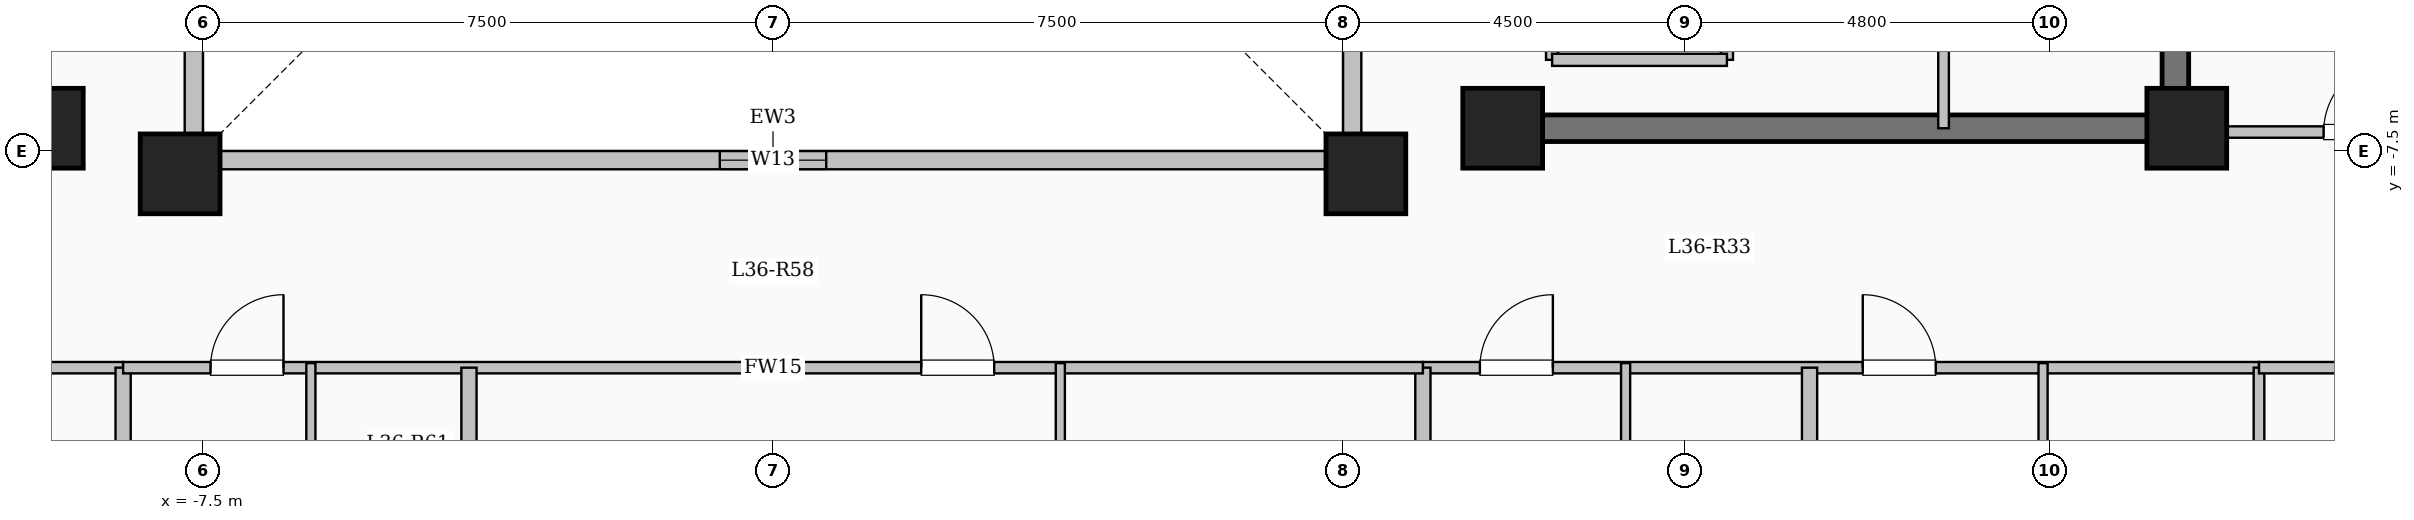
"""IFC4 building model, lengths in metres.
Left out: names, types, materials, properties, quantities, classifications, styles, units other than length and angle.
Written with IfcOpenShell. Run it as: python <this file> out.ifc"""

import sys

from ifc_helpers import new_model, si_unit, direction, frame, frame_2d, origin, origin_2d, place, context, subcontext, project, spatial, rectangle, extrude, element, fill, save


model = new_model("IFC4")
c1 = context("Model", 3, precision=1e-05, world=origin(), true_north=direction((0.0, 1.0)))
c2 = subcontext(c1, "Body", "Model", "MODEL_VIEW")
j1 = project(units=[si_unit("LENGTHUNIT", "METRE"), si_unit("PLANEANGLEUNIT", "RADIAN")], contexts=[c1])
p1 = place(None, origin())
s1 = spatial("IfcSite", under=j1, at=p1, CompositionType="ELEMENT")
p2 = place(p1, origin())
s2 = spatial("IfcBuilding", under=s1, at=p2, CompositionType="ELEMENT")
p3 = place(p2, frame((0.0, 0.0, 135.95)))
s3 = spatial("IfcBuildingStorey", under=s2, at=p3, CompositionType="ELEMENT", Elevation=135.95)
for number, where, z_axis, x_axis in (
    (1, (-7.8, -7.8, 0.0), (0.0, 0.0, 1.0), (1.0, 0.0, 0.0)),
    (2, (7.8, -7.8, 0.0), (0.0, 0.0, 1.0), (1.0, 0.0, 0.0)),
    (3, (-9.6, -7.2, 0.0), (0.0, 0.0, 1.0), (1.0, 0.0, 0.0)),
    (4, (9.6, -7.2, 0.0), (0.0, 0.0, 1.0), (1.0, 0.0, 0.0)),
    (5, (18.6, -7.2, 0.0), (0.0, 0.0, 1.0), (1.0, 0.0, 0.0)),
):
    element("IfcColumn", number, at=place(p3, frame(where, z_axis=z_axis, x_axis=x_axis)), inside=s3, PredefinedType="COLUMN", context=c2, shape_type="SweptSolid", body=[
        extrude(rectangle(XDim=1.05, YDim=1.05, at=origin_2d()), origin(), (0.0, 0.0, 1.0), 3.35),
    ])
p4 = place(p3, frame((-7.62, -7.62, 0.0), z_axis=(0.0, 0.0, 1.0), x_axis=(1.0, 0.0, 0.0)))
e6 = element("IfcWall", 6, at=p4, inside=s3, PredefinedType="SOLIDWALL", context=c2, shape_type="SweptSolid", body=[
    extrude(rectangle(XDim=15.24, YDim=0.24, at=frame_2d((7.62, 0.0))), origin(), (0.0, 0.0, 1.0), 3.1),
])
p5 = place(p4, frame((6.92, 0.0, 0.95)))
e7 = element("IfcOpeningElement", 7, at=p5, cuts=e6, PredefinedType="OPENING", context=c2, shape_type="SweptSolid", body=[
    extrude(rectangle(XDim=1.4, YDim=1.5, at=frame_2d((0.7, 0.75))), frame((0.0, 0.13, 0.0), z_axis=(0.0, -1.0, 0.0), x_axis=(1.0, 0.0, 0.0)), (0.0, 0.0, 1.0), 0.26),
])
p6 = place(p3, frame((7.62, -7.62, 0.0), z_axis=(0.0, 0.0, 1.0), x_axis=(0.0, 1.0, 0.0)))
e8 = element("IfcWall", 8, at=p6, inside=s3, PredefinedType="SOLIDWALL", context=c2, shape_type="SweptSolid", body=[
    extrude(rectangle(XDim=15.24, YDim=0.24, at=frame_2d((7.62, 0.0))), origin(), (0.0, 0.0, 1.0), 3.1),
])
p7 = place(p6, frame((6.92, 0.0, 0.95)))
e9 = element("IfcOpeningElement", 9, at=p7, cuts=e8, PredefinedType="OPENING", context=c2, shape_type="SweptSolid", body=[
    extrude(rectangle(XDim=1.4, YDim=1.5, at=frame_2d((0.7, 0.75))), frame((0.0, 0.13, 0.0), z_axis=(0.0, -1.0, 0.0), x_axis=(1.0, 0.0, 0.0)), (0.0, 0.0, 1.0), 0.26),
])
p8 = place(p3, frame((-7.62, 7.62, 0.0), z_axis=(0.0, 0.0, 1.0), x_axis=(0.0, -1.0, 0.0)))
e10 = element("IfcWall", 10, at=p8, inside=s3, PredefinedType="SOLIDWALL", context=c2, shape_type="SweptSolid", body=[
    extrude(rectangle(XDim=15.24, YDim=0.24, at=frame_2d((7.62, 0.0))), origin(), (0.0, 0.0, 1.0), 3.1),
])
p9 = place(p8, frame((6.92, 0.0, 0.95)))
e11 = element("IfcOpeningElement", 11, at=p9, cuts=e10, PredefinedType="OPENING", context=c2, shape_type="SweptSolid", body=[
    extrude(rectangle(XDim=1.4, YDim=1.5, at=frame_2d((0.7, 0.75))), frame((0.0, 0.13, 0.0), z_axis=(0.0, -1.0, 0.0), x_axis=(1.0, 0.0, 0.0)), (0.0, 0.0, 1.0), 0.26),
])
p10 = place(p3, frame((10.25, -6.3, 0.0), z_axis=(0.0, 0.0, 1.0), x_axis=(0.0, 1.0, 0.0)))
e12 = element("IfcWall", 12, at=p10, inside=s3, PredefinedType="SOLIDWALL", context=c2, shape_type="SweptSolid", body=[
    extrude(rectangle(XDim=2.6, YDim=0.16, at=frame_2d((1.3, 0.0))), origin(), (0.0, 0.0, 1.0), 3.1),
])
p11 = place(p10, frame((0.75, 0.0, 0.0)))
e13 = element("IfcOpeningElement", 13, at=p11, cuts=e12, PredefinedType="OPENING", context=c2, shape_type="SweptSolid", body=[
    extrude(rectangle(XDim=1.1, YDim=2.15, at=frame_2d((0.55, 1.075))), frame((0.0, 0.09, 0.0), z_axis=(0.0, -1.0, 0.0), x_axis=(1.0, 0.0, 0.0)), (0.0, 0.0, 1.0), 0.18),
])
p12 = place(p3, frame((12.55, -6.3, 0.0), z_axis=(0.0, 0.0, 1.0), x_axis=(0.0, 1.0, 0.0)))
e14 = element("IfcWall", 14, at=p12, inside=s3, PredefinedType="SOLIDWALL", context=c2, shape_type="SweptSolid", body=[
    extrude(rectangle(XDim=2.6, YDim=0.16, at=frame_2d((1.3, 0.0))), origin(), (0.0, 0.0, 1.0), 3.1),
])
p13 = place(p3, frame((10.25, -6.3, 0.0), z_axis=(0.0, 0.0, 1.0), x_axis=(1.0, 0.0, 0.0)))
e15 = element("IfcWall", 15, at=p13, inside=s3, PredefinedType="SOLIDWALL", context=c2, shape_type="SweptSolid", body=[
    extrude(rectangle(XDim=2.3, YDim=0.16, at=frame_2d((1.15, 0.0))), origin(), (0.0, 0.0, 1.0), 3.1),
])
p14 = place(p3, frame((18.45, -7.375, 0.0), z_axis=(0.0, 0.0, 1.0), x_axis=(0.0, 1.0, 0.0)))
e16 = element("IfcWall", 16, at=p14, inside=s3, PredefinedType="SHEAR", context=c2, shape_type="SweptSolid", body=[
    extrude(rectangle(XDim=14.05, YDim=0.35, at=frame_2d((7.025, 0.0))), origin(), (0.0, 0.0, 1.0), 3.35),
])
p15 = place(p3, frame((10.075, -7.2, 0.0), z_axis=(0.0, 0.0, 1.0), x_axis=(1.0, 0.0, 0.0)))
e17 = element("IfcWall", 17, at=p15, inside=s3, PredefinedType="SHEAR", context=c2, shape_type="SweptSolid", body=[
    extrude(rectangle(XDim=8.55, YDim=0.35, at=frame_2d((4.275, 0.0))), origin(), (0.0, 0.0, 1.0), 3.35),
])
p16 = place(p3, frame((15.4, -7.2, 0.0), z_axis=(0.0, 0.0, 1.0), x_axis=(0.0, 1.0, 0.0)))
e18 = element("IfcWall", 18, at=p16, inside=s3, PredefinedType="PARTITIONING", context=c2, shape_type="SweptSolid", body=[
    extrude(rectangle(XDim=10.45, YDim=0.14, at=frame_2d((5.225, 0.0))), origin(), (0.0, 0.0, 1.0), 3.1),
])
p17 = place(p16, frame((9.25, 0.0, 0.0)))
e19 = element("IfcOpeningElement", 19, at=p17, cuts=e18, PredefinedType="OPENING", context=c2, shape_type="SweptSolid", body=[
    extrude(rectangle(XDim=0.9, YDim=2.08, at=frame_2d((0.45, 1.04))), frame((0.0, 0.08, 0.0), z_axis=(0.0, -1.0, 0.0), x_axis=(1.0, 0.0, 0.0)), (0.0, 0.0, 1.0), 0.16),
])
p18 = place(p3, frame((-19.55, -10.35, 0.0), z_axis=(0.0, 0.0, 1.0), x_axis=(1.0, 0.0, 0.0)))
e20 = element("IfcWall", 20, at=p18, inside=s3, PredefinedType="PARTITIONING", context=c2, shape_type="SweptSolid", body=[
    extrude(rectangle(XDim=11.0, YDim=0.15, at=frame_2d((5.5, 0.0))), origin(), (0.0, 0.0, 1.0), 3.1),
])
p19 = place(p18, frame((0.7, 0.0, 0.0)))
e21 = element("IfcOpeningElement", 21, at=p19, cuts=e20, PredefinedType="OPENING", context=c2, shape_type="SweptSolid", body=[
    extrude(rectangle(XDim=0.96, YDim=2.15, at=frame_2d((0.48, 1.075))), frame((0.0, 0.085, 0.0), z_axis=(0.0, -1.0, 0.0), x_axis=(1.0, 0.0, 0.0)), (0.0, 0.0, 1.0), 0.17),
])
p20 = place(p18, frame((6.175, 0.0, 0.0)))
e22 = element("IfcOpeningElement", 22, at=p20, cuts=e20, PredefinedType="OPENING", context=c2, shape_type="SweptSolid", body=[
    extrude(rectangle(XDim=0.96, YDim=2.15, at=frame_2d((0.48, 1.075))), frame((0.0, 0.085, 0.0), z_axis=(0.0, -1.0, 0.0), x_axis=(1.0, 0.0, 0.0)), (0.0, 0.0, 1.0), 0.17),
])
p21 = place(p3, frame((8.55, -10.35, 0.0), z_axis=(0.0, 0.0, 1.0), x_axis=(1.0, 0.0, 0.0)))
e23 = element("IfcWall", 23, at=p21, inside=s3, PredefinedType="PARTITIONING", context=c2, shape_type="SweptSolid", body=[
    extrude(rectangle(XDim=11.0, YDim=0.15, at=frame_2d((5.5, 0.0))), origin(), (0.0, 0.0, 1.0), 3.1),
])
p22 = place(p21, frame((0.75, 0.0, 0.0)))
e24 = element("IfcOpeningElement", 24, at=p22, cuts=e23, PredefinedType="OPENING", context=c2, shape_type="SweptSolid", body=[
    extrude(rectangle(XDim=0.96, YDim=2.15, at=frame_2d((0.48, 1.075))), frame((0.0, 0.085, 0.0), z_axis=(0.0, -1.0, 0.0), x_axis=(1.0, 0.0, 0.0)), (0.0, 0.0, 1.0), 0.17),
])
p23 = place(p21, frame((5.787, 0.0, 0.0)))
e25 = element("IfcOpeningElement", 25, at=p23, cuts=e23, PredefinedType="OPENING", context=c2, shape_type="SweptSolid", body=[
    extrude(rectangle(XDim=0.96, YDim=2.15, at=frame_2d((0.48, 1.075))), frame((0.0, 0.085, 0.0), z_axis=(0.0, -1.0, 0.0), x_axis=(1.0, 0.0, 0.0)), (0.0, 0.0, 1.0), 0.17),
])
p24 = place(p3, frame((13.637, -21.2, 0.0), z_axis=(0.0, 0.0, 1.0), x_axis=(0.0, 1.0, 0.0)))
e26 = element("IfcWall", 26, at=p24, inside=s3, PredefinedType="SOLIDWALL", context=c2, shape_type="SweptSolid", body=[
    extrude(rectangle(XDim=10.85, YDim=0.2, at=frame_2d((5.425, 0.0))), origin(), (0.0, 0.0, 1.0), 3.1),
])
p25 = place(p3, frame((11.217, -13.51, 0.0), z_axis=(0.0, 0.0, 1.0), x_axis=(0.0, 1.0, 0.0)))
e27 = element("IfcWall", 27, at=p25, inside=s3, PredefinedType="PARTITIONING", context=c2, shape_type="SweptSolid", body=[
    extrude(rectangle(XDim=3.22, YDim=0.12, at=frame_2d((1.61, 0.0))), origin(), (0.0, 0.0, 1.0), 3.1),
])
p26 = place(p25, frame((1.14, 0.0, 0.0)))
e28 = element("IfcOpeningElement", 28, at=p26, cuts=e27, PredefinedType="OPENING", context=c2, shape_type="SweptSolid", body=[
    extrude(rectangle(XDim=0.88, YDim=2.1, at=frame_2d((0.44, 1.05))), frame((0.0, 0.07, 0.0), z_axis=(0.0, -1.0, 0.0), x_axis=(1.0, 0.0, 0.0)), (0.0, 0.0, 1.0), 0.14),
])
p27 = place(p3, frame((16.709, -13.51, 0.0), z_axis=(0.0, 0.0, 1.0), x_axis=(0.0, 1.0, 0.0)))
e29 = element("IfcWall", 29, at=p27, inside=s3, PredefinedType="PARTITIONING", context=c2, shape_type="SweptSolid", body=[
    extrude(rectangle(XDim=3.22, YDim=0.12, at=frame_2d((1.61, 0.0))), origin(), (0.0, 0.0, 1.0), 3.1),
])
p28 = place(p27, frame((1.14, 0.0, 0.0)))
e30 = element("IfcOpeningElement", 30, at=p28, cuts=e29, PredefinedType="OPENING", context=c2, shape_type="SweptSolid", body=[
    extrude(rectangle(XDim=0.88, YDim=2.1, at=frame_2d((0.44, 1.05))), frame((0.0, 0.07, 0.0), z_axis=(0.0, -1.0, 0.0), x_axis=(1.0, 0.0, 0.0)), (0.0, 0.0, 1.0), 0.14),
])
for number, where, z_axis, x_axis in (
    (31, (-8.55, -21.804, 0.0), (0.0, 0.0, 1.0), (0.0, 1.0, 0.0)),
    (32, (8.55, -21.804, 0.0), (0.0, 0.0, 1.0), (0.0, 1.0, 0.0)),
):
    element("IfcWall", number, at=place(p3, frame(where, z_axis=z_axis, x_axis=x_axis)), inside=s3, PredefinedType="SOLIDWALL", context=c2, shape_type="SweptSolid", body=[
        extrude(rectangle(XDim=11.454, YDim=0.2, at=frame_2d((5.727, 0.0))), origin(), (0.0, 0.0, 1.0), 3.1),
    ])
p29 = place(p3, frame((-8.55, -10.35, 0.0), z_axis=(0.0, 0.0, 1.0), x_axis=(1.0, 0.0, 0.0)))
e33 = element("IfcWall", 33, at=p29, inside=s3, PredefinedType="PARTITIONING", context=c2, shape_type="SweptSolid", body=[
    extrude(rectangle(XDim=17.1, YDim=0.15, at=frame_2d((8.55, 0.0))), origin(), (0.0, 0.0, 1.0), 3.1),
])
p30 = place(p29, frame((1.15, 0.0, 0.0)))
e34 = element("IfcOpeningElement", 34, at=p30, cuts=e33, PredefinedType="OPENING", context=c2, shape_type="SweptSolid", body=[
    extrude(rectangle(XDim=0.96, YDim=2.15, at=frame_2d((0.48, 1.075))), frame((0.0, 0.085, 0.0), z_axis=(0.0, -1.0, 0.0), x_axis=(1.0, 0.0, 0.0)), (0.0, 0.0, 1.0), 0.17),
])
p31 = place(p29, frame((10.5, 0.0, 0.0)))
e35 = element("IfcOpeningElement", 35, at=p31, cuts=e33, PredefinedType="OPENING", context=c2, shape_type="SweptSolid", body=[
    extrude(rectangle(XDim=0.96, YDim=2.15, at=frame_2d((0.48, 1.075))), frame((0.0, 0.085, 0.0), z_axis=(0.0, -1.0, 0.0), x_axis=(1.0, 0.0, 0.0)), (0.0, 0.0, 1.0), 0.17),
])
p32 = place(p3, frame((-4.0, -21.15, 0.0), z_axis=(0.0, 0.0, 1.0), x_axis=(0.0, 1.0, 0.0)))
e36 = element("IfcWall", 36, at=p32, inside=s3, PredefinedType="SOLIDWALL", context=c2, shape_type="SweptSolid", body=[
    extrude(rectangle(XDim=10.8, YDim=0.2, at=frame_2d((5.4, 0.0))), origin(), (0.0, 0.0, 1.0), 3.1),
])
p33 = place(p3, frame((-6.08, -13.51, 0.0), z_axis=(0.0, 0.0, 1.0), x_axis=(0.0, 1.0, 0.0)))
e37 = element("IfcWall", 37, at=p33, inside=s3, PredefinedType="PARTITIONING", context=c2, shape_type="SweptSolid", body=[
    extrude(rectangle(XDim=3.22, YDim=0.12, at=frame_2d((1.61, 0.0))), origin(), (0.0, 0.0, 1.0), 3.1),
])
p34 = place(p33, frame((1.14, 0.0, 0.0)))
e38 = element("IfcOpeningElement", 38, at=p34, cuts=e37, PredefinedType="OPENING", context=c2, shape_type="SweptSolid", body=[
    extrude(rectangle(XDim=0.88, YDim=2.1, at=frame_2d((0.44, 1.05))), frame((0.0, 0.07, 0.0), z_axis=(0.0, -1.0, 0.0), x_axis=(1.0, 0.0, 0.0)), (0.0, 0.0, 1.0), 0.14),
])
p35 = place(p3, frame((3.78, -13.51, 0.0), z_axis=(0.0, 0.0, 1.0), x_axis=(0.0, 1.0, 0.0)))
e39 = element("IfcWall", 39, at=p35, inside=s3, PredefinedType="PARTITIONING", context=c2, shape_type="SweptSolid", body=[
    extrude(rectangle(XDim=3.22, YDim=0.12, at=frame_2d((1.61, 0.0))), origin(), (0.0, 0.0, 1.0), 3.1),
])
p36 = place(p35, frame((1.14, 0.0, 0.0)))
e40 = element("IfcOpeningElement", 40, at=p36, cuts=e39, PredefinedType="OPENING", context=c2, shape_type="SweptSolid", body=[
    extrude(rectangle(XDim=0.88, YDim=2.1, at=frame_2d((0.44, 1.05))), frame((0.0, 0.07, 0.0), z_axis=(0.0, -1.0, 0.0), x_axis=(1.0, 0.0, 0.0)), (0.0, 0.0, 1.0), 0.14),
])
p37 = place(p3, frame((18.45, -7.25, 0.0), z_axis=(0.0, 0.0, 1.0), x_axis=(1.0, 0.0, 0.0)))
e41 = element("IfcWall", 41, at=p37, inside=s3, PredefinedType="PARTITIONING", context=c2, shape_type="SweptSolid", body=[
    extrude(rectangle(XDim=6.63, YDim=0.15, at=frame_2d((3.315, 0.0))), origin(), (0.0, 0.0, 1.0), 3.1),
])
p38 = place(p37, frame((1.95, 0.0, 0.0)))
e42 = element("IfcOpeningElement", 42, at=p38, cuts=e41, PredefinedType="OPENING", context=c2, shape_type="SweptSolid", body=[
    extrude(rectangle(XDim=0.96, YDim=2.15, at=frame_2d((0.48, 1.075))), frame((0.0, 0.085, 0.0), z_axis=(0.0, -1.0, 0.0), x_axis=(1.0, 0.0, 0.0)), (0.0, 0.0, 1.0), 0.17),
])
p39 = place(p3, frame((19.55, -17.25, 0.0), z_axis=(0.0, 0.0, 1.0), x_axis=(0.0, 1.0, 0.0)))
e43 = element("IfcWall", 43, at=p39, inside=s3, PredefinedType="PARTITIONING", context=c2, shape_type="SweptSolid", body=[
    extrude(rectangle(XDim=6.9, YDim=0.14, at=frame_2d((3.45, 0.0))), origin(), (0.0, 0.0, 1.0), 3.1),
])
p40 = place(p3, frame((19.55, -10.35, 0.0), z_axis=(0.0, 0.0, 1.0), x_axis=(1.0, 0.0, 0.0)))
e44 = element("IfcWall", 44, at=p40, inside=s3, PredefinedType="PARTITIONING", context=c2, shape_type="SweptSolid", body=[
    extrude(rectangle(XDim=5.53, YDim=0.15, at=frame_2d((2.765, 0.0))), origin(), (0.0, 0.0, 1.0), 3.1),
])
p41 = place(p40, frame((2.29, 0.0, 0.0)))
e45 = element("IfcOpeningElement", 45, at=p41, cuts=e44, PredefinedType="OPENING", context=c2, shape_type="SweptSolid", body=[
    extrude(rectangle(XDim=0.95, YDim=2.15, at=frame_2d((0.475, 1.075))), frame((0.0, 0.085, 0.0), z_axis=(0.0, -1.0, 0.0), x_axis=(1.0, 0.0, 0.0)), (0.0, 0.0, 1.0), 0.17),
])
p42 = place(p5, origin())
e46 = element("IfcWindow", 46, at=p42, inside=s3, PartitioningType="SINGLE_PANEL", PredefinedType="WINDOW", context=c2, shape_type="SweptSolid", body=[
    extrude(rectangle(XDim=1.4, YDim=1.5, at=frame_2d((0.7, 0.75))), frame((0.0, 0.03, 0.0), z_axis=(0.0, -1.0, 0.0), x_axis=(1.0, 0.0, 0.0)), (0.0, 0.0, 1.0), 0.06),
])
fill(e7, e46)
p43 = place(p22, origin())
e47 = element("IfcDoor", 47, at=p43, inside=s3, OperationType="SINGLE_SWING_RIGHT", PredefinedType="DOOR", context=c2, shape_type="SweptSolid", body=[
    extrude(rectangle(XDim=0.96, YDim=2.15, at=frame_2d((0.48, 1.075))), frame((0.0, 0.025, 0.0), z_axis=(0.0, -1.0, 0.0), x_axis=(1.0, 0.0, 0.0)), (0.0, 0.0, 1.0), 0.05),
])
fill(e24, e47)
p44 = place(p23, origin())
e48 = element("IfcDoor", 48, at=p44, inside=s3, OperationType="SINGLE_SWING_LEFT", PredefinedType="DOOR", context=c2, shape_type="SweptSolid", body=[
    extrude(rectangle(XDim=0.96, YDim=2.15, at=frame_2d((0.48, 1.075))), frame((0.0, 0.025, 0.0), z_axis=(0.0, -1.0, 0.0), x_axis=(1.0, 0.0, 0.0)), (0.0, 0.0, 1.0), 0.05),
])
fill(e25, e48)
p45 = place(p30, origin())
e49 = element("IfcDoor", 49, at=p45, inside=s3, OperationType="SINGLE_SWING_RIGHT", PredefinedType="DOOR", context=c2, shape_type="SweptSolid", body=[
    extrude(rectangle(XDim=0.96, YDim=2.15, at=frame_2d((0.48, 1.075))), frame((0.0, 0.025, 0.0), z_axis=(0.0, -1.0, 0.0), x_axis=(1.0, 0.0, 0.0)), (0.0, 0.0, 1.0), 0.05),
])
fill(e34, e49)
p46 = place(p31, origin())
e50 = element("IfcDoor", 50, at=p46, inside=s3, OperationType="SINGLE_SWING_LEFT", PredefinedType="DOOR", context=c2, shape_type="SweptSolid", body=[
    extrude(rectangle(XDim=0.96, YDim=2.15, at=frame_2d((0.48, 1.075))), frame((0.0, 0.025, 0.0), z_axis=(0.0, -1.0, 0.0), x_axis=(1.0, 0.0, 0.0)), (0.0, 0.0, 1.0), 0.05),
])
fill(e35, e50)
p47 = place(p38, origin())
e51 = element("IfcDoor", 51, at=p47, inside=s3, OperationType="SINGLE_SWING_RIGHT", PredefinedType="DOOR", context=c2, shape_type="SweptSolid", body=[
    extrude(rectangle(XDim=0.96, YDim=2.15, at=frame_2d((0.48, 1.075))), frame((0.0, 0.025, 0.0), z_axis=(0.0, -1.0, 0.0), x_axis=(1.0, 0.0, 0.0)), (0.0, 0.0, 1.0), 0.05),
])
fill(e42, e51)
save(model, sys.argv[1])
